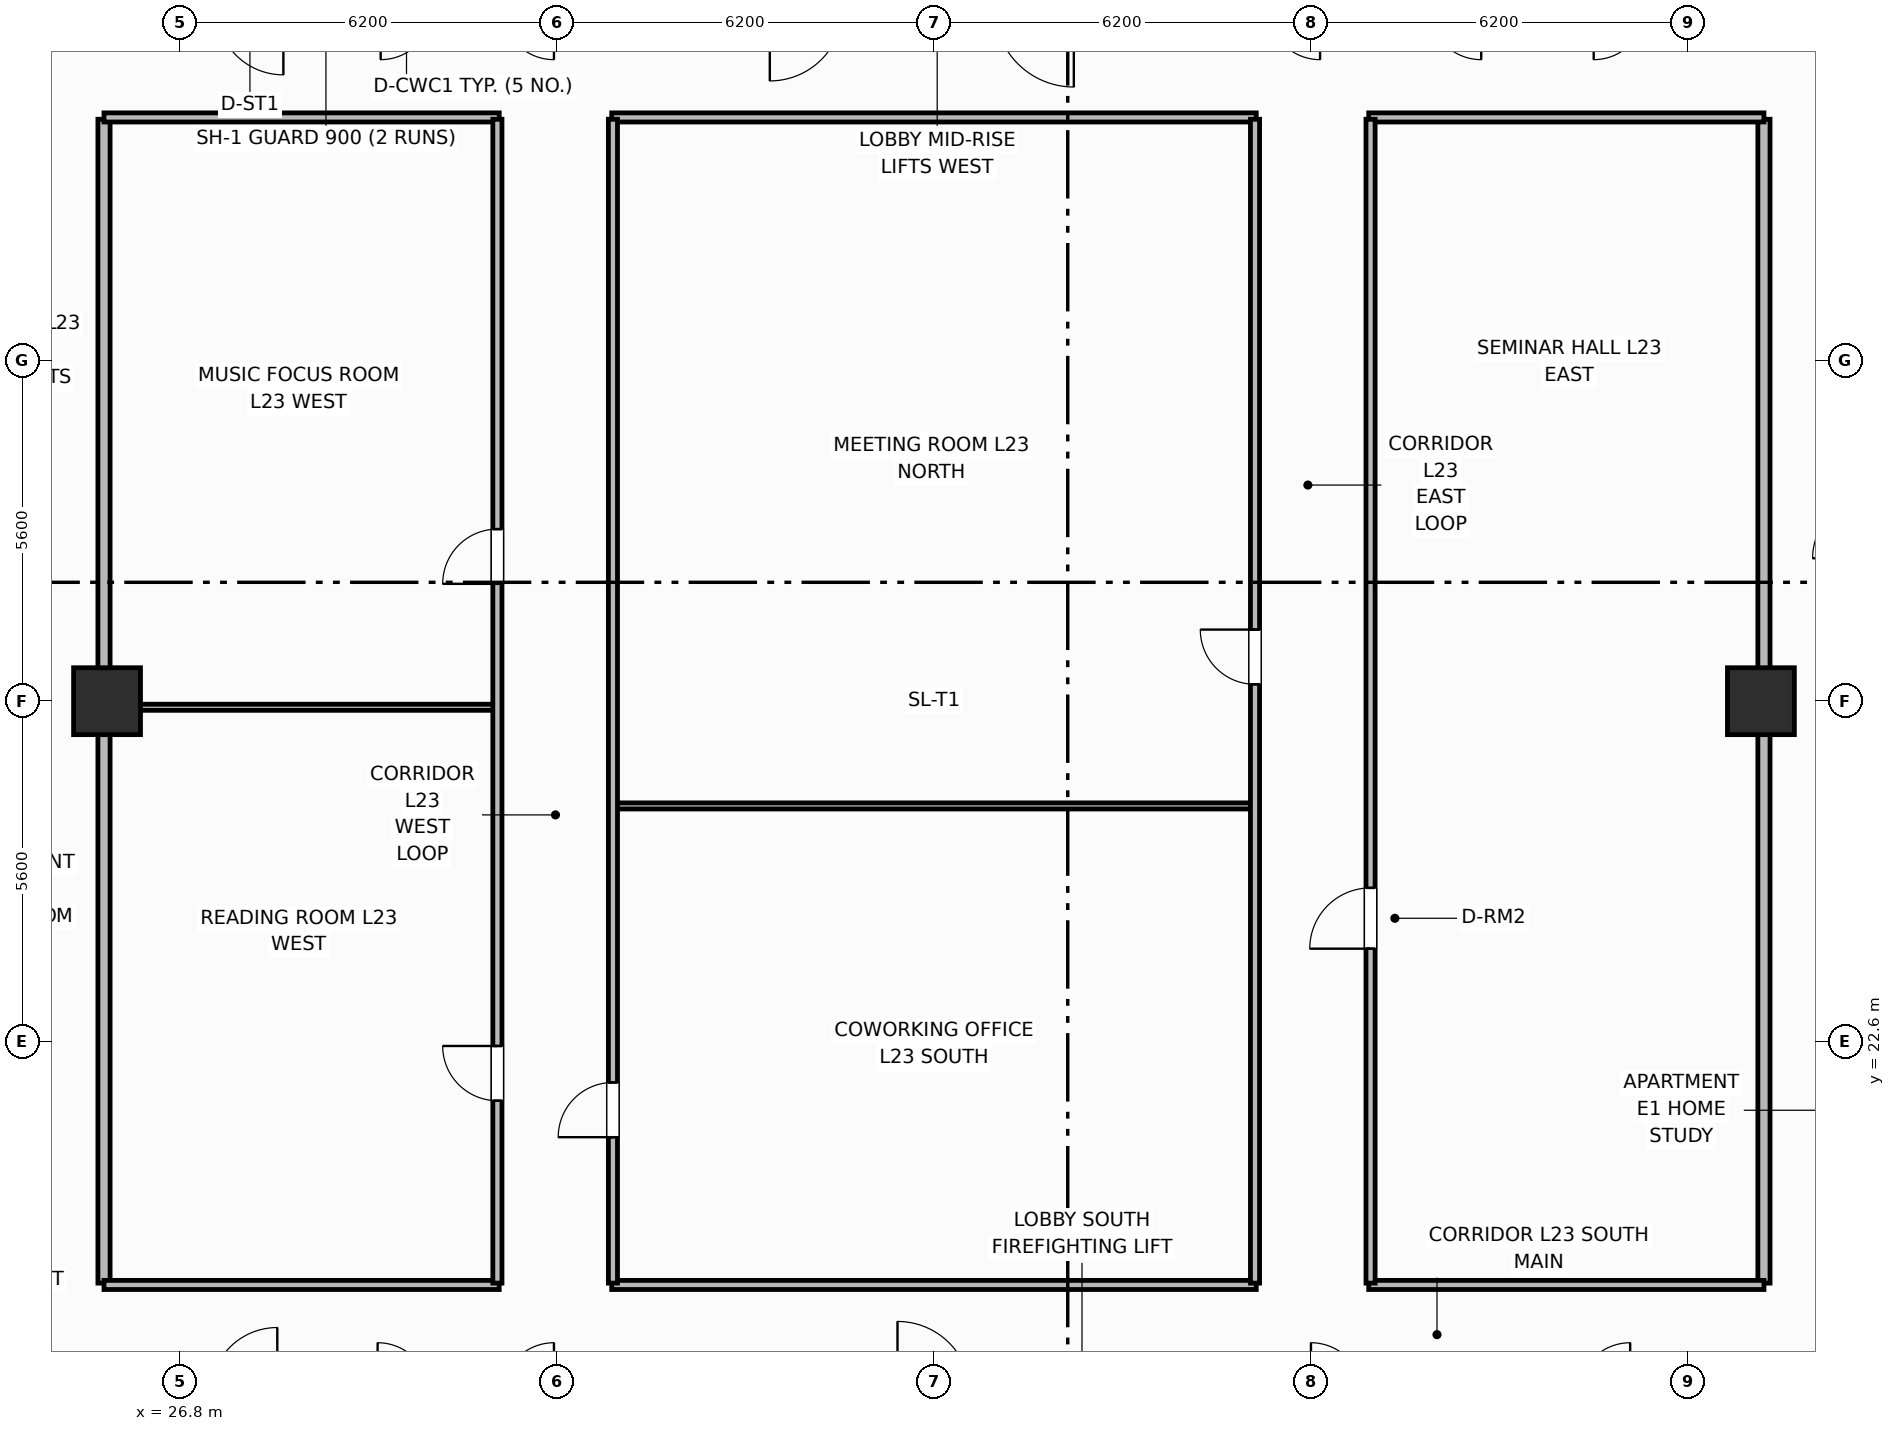
"""IFC4 building model, lengths in metres.
Left out: names, types, materials, properties, quantities, classifications, styles, units other than length and angle.
Written with IfcOpenShell. Run it as: python <this file> out.ifc"""

import sys

from ifc_helpers import new_model, si_unit, direction, frame, frame_2d, origin, origin_2d, place, context, subcontext, project, spatial, rectangle, extrude, element, fill, save


model = new_model("IFC4")
c1 = context("Model", 3, precision=1e-05, world=origin(), true_north=direction((0.0, 1.0)))
c2 = subcontext(c1, "Body", "Model", "MODEL_VIEW")
j1 = project(units=[si_unit("LENGTHUNIT", "METRE"), si_unit("PLANEANGLEUNIT", "RADIAN")], contexts=[c1])
p1 = place(None, origin())
s1 = spatial("IfcSite", under=j1, at=p1, CompositionType="ELEMENT")
p2 = place(p1, origin())
s2 = spatial("IfcBuilding", under=s1, at=p2, CompositionType="ELEMENT")
p3 = place(p2, frame((0.0, 0.0, 95.7)))
s3 = spatial("IfcBuildingStorey", under=s2, at=p3, CompositionType="ELEMENT", Elevation=95.7)
for number, where, z_axis, x_axis in (
    (1, (25.6, 28.2, 0.0), (0.0, 0.0, 1.0), (1.0, 0.0, 0.0)),
    (2, (52.8, 28.2, 0.0), (0.0, 0.0, 1.0), (1.0, 0.0, 0.0)),
):
    element("IfcColumn", number, at=place(p3, frame(where, z_axis=z_axis, x_axis=x_axis)), inside=s3, PredefinedType="COLUMN", context=c2, shape_type="SweptSolid", body=[
        extrude(rectangle(XDim=1.1, YDim=1.1, at=origin_2d()), origin(), (0.0, 0.0, 1.0), 3.7),
    ])
for number, where, z_axis, x_axis in (
    (3, (25.55, 18.63, 0.0), (0.0, 0.0, 1.0), (0.0, 1.0, 0.0)),
    (4, (52.85, 18.63, 0.0), (0.0, 0.0, 1.0), (0.0, 1.0, 0.0)),
):
    element("IfcWall", number, at=place(p3, frame(where, z_axis=z_axis, x_axis=x_axis)), inside=s3, PredefinedType="PARTITIONING", context=c2, shape_type="SweptSolid", body=[
        extrude(rectangle(XDim=19.14, YDim=0.2, at=frame_2d((9.57, 0.0))), origin(), (0.0, 0.0, 1.0), 2.53),
    ])
for number, where, z_axis, x_axis in (
    (5, (25.55, 18.6, 0.0), (0.0, 0.0, 1.0), (1.0, 0.0, 0.0)),
    (6, (25.55, 37.8, 0.0), (0.0, 0.0, 1.0), (1.0, 0.0, 0.0)),
):
    element("IfcWall", number, at=place(p3, frame(where, z_axis=z_axis, x_axis=x_axis)), inside=s3, PredefinedType="PARTITIONING", context=c2, shape_type="SweptSolid", body=[
        extrude(rectangle(XDim=6.5, YDim=0.15, at=frame_2d((3.25, 0.0))), origin(), (0.0, 0.0, 1.0), 2.53),
    ])
for number, where, z_axis, x_axis in (
    (7, (33.9, 18.6, 0.0), (0.0, 0.0, 1.0), (1.0, 0.0, 0.0)),
    (8, (33.9, 37.8, 0.0), (0.0, 0.0, 1.0), (1.0, 0.0, 0.0)),
):
    element("IfcWall", number, at=place(p3, frame(where, z_axis=z_axis, x_axis=x_axis)), inside=s3, PredefinedType="PARTITIONING", context=c2, shape_type="SweptSolid", body=[
        extrude(rectangle(XDim=10.6, YDim=0.15, at=frame_2d((5.3, 0.0))), origin(), (0.0, 0.0, 1.0), 2.53),
    ])
for number, where, z_axis, x_axis in (
    (9, (46.35, 18.6, 0.0), (0.0, 0.0, 1.0), (1.0, 0.0, 0.0)),
    (10, (46.35, 37.8, 0.0), (0.0, 0.0, 1.0), (1.0, 0.0, 0.0)),
):
    element("IfcWall", number, at=place(p3, frame(where, z_axis=z_axis, x_axis=x_axis)), inside=s3, PredefinedType="PARTITIONING", context=c2, shape_type="SweptSolid", body=[
        extrude(rectangle(XDim=6.5, YDim=0.15, at=frame_2d((3.25, 0.0))), origin(), (0.0, 0.0, 1.0), 2.53),
    ])
p4 = place(p3, frame((25.6, 28.1, 0.0), z_axis=(0.0, 0.0, 1.0), x_axis=(1.0, 0.0, 0.0)))
e11 = element("IfcWall", 11, at=p4, inside=s3, PredefinedType="PARTITIONING", context=c2, shape_type="SweptSolid", body=[
    extrude(rectangle(XDim=6.42, YDim=0.1, at=frame_2d((3.21, 0.0))), origin(), (0.0, 0.0, 1.0), 2.53),
])
p5 = place(p3, frame((33.92, 26.477, 0.0), z_axis=(0.0, 0.0, 1.0), x_axis=(1.0, 0.0, 0.0)))
e12 = element("IfcWall", 12, at=p5, inside=s3, PredefinedType="PARTITIONING", context=c2, shape_type="SweptSolid", body=[
    extrude(rectangle(XDim=10.56, YDim=0.1, at=frame_2d((5.28, 0.0))), origin(), (0.0, 0.0, 1.0), 2.53),
])
p6 = place(p3, frame((32.02, 18.63, 0.0), z_axis=(0.0, 0.0, 1.0), x_axis=(0.0, 1.0, 0.0)))
e13 = element("IfcWall", 13, at=p6, inside=s3, PredefinedType="PARTITIONING", context=c2, shape_type="SweptSolid", body=[
    extrude(rectangle(XDim=19.14, YDim=0.15, at=frame_2d((9.57, 0.0))), origin(), (0.0, 0.0, 1.0), 2.53),
])
p7 = place(p6, frame((3.0, 0.0, 0.0)))
e14 = element("IfcOpeningElement", 14, at=p7, cuts=e13, PredefinedType="OPENING", context=c2, shape_type="SweptSolid", body=[
    extrude(rectangle(XDim=0.9, YDim=2.1, at=frame_2d((0.45, 1.05))), frame((0.0, 0.085, 0.0), z_axis=(0.0, -1.0, 0.0), x_axis=(1.0, 0.0, 0.0)), (0.0, 0.0, 1.0), 0.17),
])
p8 = place(p6, frame((11.5, 0.0, 0.0)))
e15 = element("IfcOpeningElement", 15, at=p8, cuts=e13, PredefinedType="OPENING", context=c2, shape_type="SweptSolid", body=[
    extrude(rectangle(XDim=0.9, YDim=2.1, at=frame_2d((0.45, 1.05))), frame((0.0, 0.085, 0.0), z_axis=(0.0, -1.0, 0.0), x_axis=(1.0, 0.0, 0.0)), (0.0, 0.0, 1.0), 0.17),
])
p9 = place(p3, frame((33.92, 18.63, 0.0), z_axis=(0.0, 0.0, 1.0), x_axis=(0.0, 1.0, 0.0)))
e16 = element("IfcWall", 16, at=p9, inside=s3, PredefinedType="PARTITIONING", context=c2, shape_type="SweptSolid", body=[
    extrude(rectangle(XDim=19.14, YDim=0.15, at=frame_2d((9.57, 0.0))), origin(), (0.0, 0.0, 1.0), 2.53),
])
p10 = place(p9, frame((2.4, 0.0, 0.0)))
e17 = element("IfcOpeningElement", 17, at=p10, cuts=e16, PredefinedType="OPENING", context=c2, shape_type="SweptSolid", body=[
    extrude(rectangle(XDim=0.9, YDim=2.1, at=frame_2d((0.45, 1.05))), frame((0.0, 0.085, 0.0), z_axis=(0.0, -1.0, 0.0), x_axis=(1.0, 0.0, 0.0)), (0.0, 0.0, 1.0), 0.17),
])
p11 = place(p3, frame((44.48, 18.63, 0.0), z_axis=(0.0, 0.0, 1.0), x_axis=(0.0, 1.0, 0.0)))
e18 = element("IfcWall", 18, at=p11, inside=s3, PredefinedType="PARTITIONING", context=c2, shape_type="SweptSolid", body=[
    extrude(rectangle(XDim=19.14, YDim=0.15, at=frame_2d((9.57, 0.0))), origin(), (0.0, 0.0, 1.0), 2.53),
])
p12 = place(p11, frame((9.847, 0.0, 0.0)))
e19 = element("IfcOpeningElement", 19, at=p12, cuts=e18, PredefinedType="OPENING", context=c2, shape_type="SweptSolid", body=[
    extrude(rectangle(XDim=0.9, YDim=2.1, at=frame_2d((0.45, 1.05))), frame((0.0, 0.085, 0.0), z_axis=(0.0, -1.0, 0.0), x_axis=(1.0, 0.0, 0.0)), (0.0, 0.0, 1.0), 0.17),
])
p13 = place(p3, frame((46.38, 18.63, 0.0), z_axis=(0.0, 0.0, 1.0), x_axis=(0.0, 1.0, 0.0)))
e20 = element("IfcWall", 20, at=p13, inside=s3, PredefinedType="PARTITIONING", context=c2, shape_type="SweptSolid", body=[
    extrude(rectangle(XDim=19.14, YDim=0.15, at=frame_2d((9.57, 0.0))), origin(), (0.0, 0.0, 1.0), 2.53),
])
p14 = place(p13, frame((5.5, 0.0, 0.0)))
e21 = element("IfcOpeningElement", 21, at=p14, cuts=e20, PredefinedType="OPENING", context=c2, shape_type="SweptSolid", body=[
    extrude(rectangle(XDim=1.0, YDim=2.15, at=frame_2d((0.5, 1.075))), frame((0.0, 0.085, 0.0), z_axis=(0.0, -1.0, 0.0), x_axis=(1.0, 0.0, 0.0)), (0.0, 0.0, 1.0), 0.17),
])
p15 = place(p7, origin())
e22 = element("IfcDoor", 22, at=p15, inside=s3, OperationType="SINGLE_SWING_RIGHT", PredefinedType="DOOR", context=c2, shape_type="SweptSolid", body=[
    extrude(rectangle(XDim=0.9, YDim=2.1, at=frame_2d((0.45, 1.05))), frame((0.0, 0.025, 0.0), z_axis=(0.0, -1.0, 0.0), x_axis=(1.0, 0.0, 0.0)), (0.0, 0.0, 1.0), 0.05),
])
fill(e14, e22)
p16 = place(p8, origin())
e23 = element("IfcDoor", 23, at=p16, inside=s3, OperationType="SINGLE_SWING_LEFT", PredefinedType="DOOR", context=c2, shape_type="SweptSolid", body=[
    extrude(rectangle(XDim=0.9, YDim=2.1, at=frame_2d((0.45, 1.05))), frame((0.0, 0.025, 0.0), z_axis=(0.0, -1.0, 0.0), x_axis=(1.0, 0.0, 0.0)), (0.0, 0.0, 1.0), 0.05),
])
fill(e15, e23)
p17 = place(p10, origin())
e24 = element("IfcDoor", 24, at=p17, inside=s3, OperationType="SINGLE_SWING_LEFT", PredefinedType="DOOR", context=c2, shape_type="SweptSolid", body=[
    extrude(rectangle(XDim=0.9, YDim=2.1, at=frame_2d((0.45, 1.05))), frame((0.0, 0.025, 0.0), z_axis=(0.0, -1.0, 0.0), x_axis=(1.0, 0.0, 0.0)), (0.0, 0.0, 1.0), 0.05),
])
fill(e17, e24)
p18 = place(p12, origin())
e25 = element("IfcDoor", 25, at=p18, inside=s3, OperationType="SINGLE_SWING_RIGHT", PredefinedType="DOOR", context=c2, shape_type="SweptSolid", body=[
    extrude(rectangle(XDim=0.9, YDim=2.1, at=frame_2d((0.45, 1.05))), frame((0.0, 0.025, 0.0), z_axis=(0.0, -1.0, 0.0), x_axis=(1.0, 0.0, 0.0)), (0.0, 0.0, 1.0), 0.05),
])
fill(e19, e25)
p19 = place(p14, origin())
e26 = element("IfcDoor", 26, at=p19, inside=s3, OperationType="SINGLE_SWING_LEFT", PredefinedType="DOOR", context=c2, shape_type="SweptSolid", body=[
    extrude(rectangle(XDim=1.0, YDim=2.15, at=frame_2d((0.5, 1.075))), frame((0.0, 0.025, 0.0), z_axis=(0.0, -1.0, 0.0), x_axis=(1.0, 0.0, 0.0)), (0.0, 0.0, 1.0), 0.05),
])
fill(e21, e26)
save(model, sys.argv[1])
